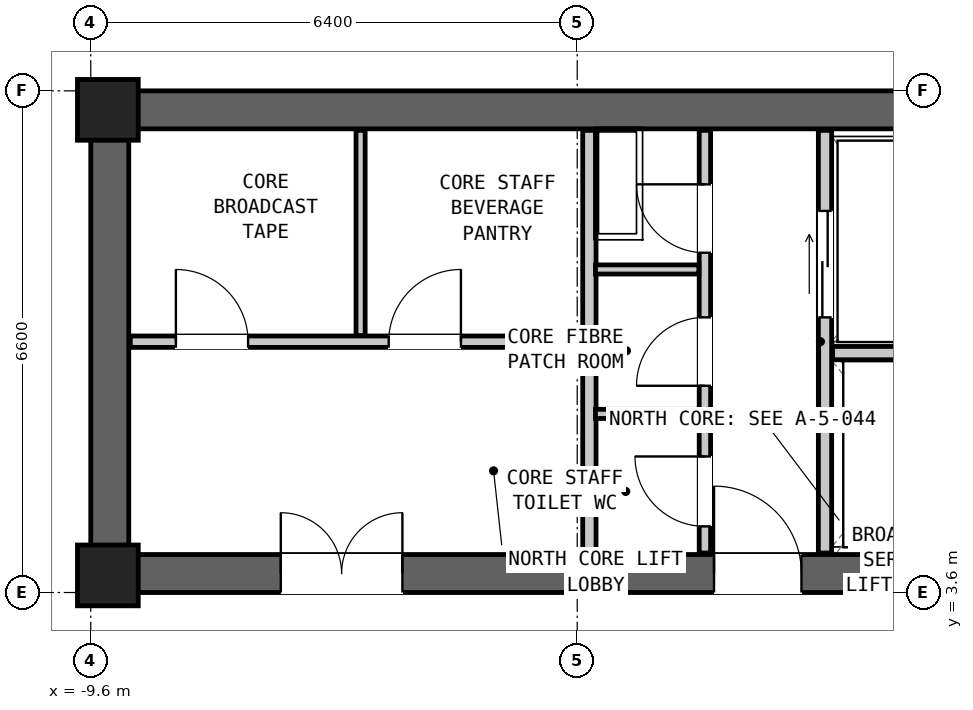
"""IFC4 building model, lengths in metres.
Left out: names, types, materials, properties, quantities, classifications, styles, units other than length and angle.
Written with IfcOpenShell. Run it as: python <this file> out.ifc"""

import sys

from ifc_helpers import new_model, si_unit, direction, frame, frame_2d, origin, origin_2d, place, context, subcontext, project, spatial, rectangle, extrude, element, fill, save


model = new_model("IFC4")
c1 = context("Model", 3, precision=1e-05, world=origin(), true_north=direction((0.0, 1.0)))
c2 = subcontext(c1, "Body", "Model", "MODEL_VIEW")
j1 = project(units=[si_unit("LENGTHUNIT", "METRE"), si_unit("PLANEANGLEUNIT", "RADIAN")], contexts=[c1])
p1 = place(None, origin())
s1 = spatial("IfcSite", under=j1, at=p1, CompositionType="ELEMENT")
p2 = place(p1, origin())
s2 = spatial("IfcBuilding", under=s1, at=p2, CompositionType="ELEMENT")
p3 = place(p2, frame((0.0, 0.0, 140.25)))
s3 = spatial("IfcBuildingStorey", under=s2, at=p3, CompositionType="ELEMENT", Elevation=140.25)
p4 = place(p3, frame((-9.6, 9.95, 0.0), z_axis=(0.0, 0.0, 1.0), x_axis=(1.0, 0.0, 0.0)))
e1 = element("IfcWall", 1, at=p4, inside=s3, PredefinedType="SHEAR", context=c2, shape_type="SweptSolid", body=[
    extrude(rectangle(XDim=19.2, YDim=0.5, at=frame_2d((9.6, 0.0))), origin(), (0.0, 0.0, 1.0), 4.35),
])
p5 = place(p3, frame((-9.6, 3.85, 0.0), z_axis=(0.0, 0.0, 1.0), x_axis=(1.0, 0.0, 0.0)))
e2 = element("IfcWall", 2, at=p5, inside=s3, PredefinedType="SHEAR", context=c2, shape_type="SweptSolid", body=[
    extrude(rectangle(XDim=19.2, YDim=0.5, at=frame_2d((9.6, 0.0))), origin(), (0.0, 0.0, 1.0), 4.35),
])
p6 = place(p5, frame((14.2, 0.0, 0.0)))
e3 = element("IfcOpeningElement", 3, at=p6, cuts=e2, PredefinedType="OPENING", context=c2, shape_type="SweptSolid", body=[
    extrude(rectangle(XDim=1.1, YDim=2.08, at=frame_2d((0.55, 1.04))), frame((0.0, 0.262, 0.0), z_axis=(0.0, -1.0, 0.0), x_axis=(1.0, 0.0, 0.0)), (0.0, 0.0, 1.0), 0.524),
])
p7 = place(p5, frame((8.2, 0.0, 0.0)))
e4 = element("IfcOpeningElement", 4, at=p7, cuts=e2, PredefinedType="OPENING", context=c2, shape_type="SweptSolid", body=[
    extrude(rectangle(XDim=1.15, YDim=2.1, at=frame_2d((0.575, 1.05))), frame((0.0, 0.262, 0.0), z_axis=(0.0, -1.0, 0.0), x_axis=(1.0, 0.0, 0.0)), (0.0, 0.0, 1.0), 0.524),
])
p8 = place(p5, frame((2.5, 0.0, 0.0)))
e5 = element("IfcOpeningElement", 5, at=p8, cuts=e2, PredefinedType="OPENING", context=c2, shape_type="SweptSolid", body=[
    extrude(rectangle(XDim=1.6, YDim=2.12, at=frame_2d((0.8, 1.06))), frame((0.0, 0.262, 0.0), z_axis=(0.0, -1.0, 0.0), x_axis=(1.0, 0.0, 0.0)), (0.0, 0.0, 1.0), 0.524),
])
p9 = place(p3, frame((-9.35, 3.6, 0.0), z_axis=(0.0, 0.0, 1.0), x_axis=(0.0, 1.0, 0.0)))
e6 = element("IfcWall", 6, at=p9, inside=s3, PredefinedType="SHEAR", context=c2, shape_type="SweptSolid", body=[
    extrude(rectangle(XDim=6.6, YDim=0.5, at=frame_2d((3.3, 0.0))), origin(), (0.0, 0.0, 1.0), 4.35),
])
for number, where, z_axis, x_axis in (
    (7, (-9.375, 9.95, 0.0), (0.0, 0.0, 1.0), (1.0, 0.0, 0.0)),
    (8, (-9.375, 3.825, 0.0), (0.0, 0.0, 1.0), (1.0, 0.0, 0.0)),
):
    element("IfcColumn", number, at=place(p3, frame(where, z_axis=z_axis, x_axis=x_axis)), inside=s3, PredefinedType="COLUMN", context=c2, shape_type="SweptSolid", body=[
        extrude(rectangle(XDim=0.8, YDim=0.8, at=origin_2d()), origin(), (0.0, 0.0, 1.0), 4.35),
    ])
p10 = place(p3, frame((0.06, 4.12, 0.0), z_axis=(0.0, 0.0, 1.0), x_axis=(0.0, 1.0, 0.0)))
e9 = element("IfcWall", 9, at=p10, inside=s3, PredefinedType="PARTITIONING", context=c2, shape_type="SweptSolid", body=[
    extrude(rectangle(XDim=5.56, YDim=0.175, at=frame_2d((2.78, 0.0))), origin(), (0.0, 0.0, 1.0), 4.07),
])
p11 = place(p10, frame((3.1, 0.0, 0.0)))
e10 = element("IfcOpeningElement", 10, at=p11, cuts=e9, PredefinedType="OPENING", context=c2, shape_type="SweptSolid", body=[
    extrude(rectangle(XDim=1.4, YDim=2.12, at=frame_2d((0.7, 1.06))), frame((0.0, 0.1, 0.0), z_axis=(0.0, -1.0, 0.0), x_axis=(1.0, 0.0, 0.0)), (0.0, 0.0, 1.0), 0.199),
])
p12 = place(p3, frame((0.16, 6.75, 0.0), z_axis=(0.0, 0.0, 1.0), x_axis=(1.0, 0.0, 0.0)))
e11 = element("IfcWall", 11, at=p12, inside=s3, PredefinedType="PARTITIONING", context=c2, shape_type="SweptSolid", body=[
    extrude(rectangle(XDim=1.98, YDim=0.175, at=frame_2d((0.99, 0.0))), origin(), (0.0, 0.0, 1.0), 4.07),
])
p13 = place(p3, frame((-3.04, 4.12, 0.0), z_axis=(0.0, 0.0, 1.0), x_axis=(0.0, 1.0, 0.0)))
e12 = element("IfcWall", 12, at=p13, inside=s3, PredefinedType="PARTITIONING", context=c2, shape_type="SweptSolid", body=[
    extrude(rectangle(XDim=5.56, YDim=0.175, at=frame_2d((2.78, 0.0))), origin(), (0.0, 0.0, 1.0), 4.07),
])
p14 = place(p3, frame((-1.52, 4.12, 0.0), z_axis=(0.0, 0.0, 1.0), x_axis=(0.0, 1.0, 0.0)))
e13 = element("IfcWall", 13, at=p14, inside=s3, PredefinedType="PARTITIONING", context=c2, shape_type="SweptSolid", body=[
    extrude(rectangle(XDim=5.56, YDim=0.15, at=frame_2d((2.78, 0.0))), origin(), (0.0, 0.0, 1.0), 4.07),
])
p15 = place(p14, frame((3.95, 0.0, 0.0)))
e14 = element("IfcOpeningElement", 14, at=p15, cuts=e13, PredefinedType="OPENING", context=c2, shape_type="SweptSolid", body=[
    extrude(rectangle(XDim=0.9, YDim=2.05, at=frame_2d((0.45, 1.025))), frame((0.0, 0.087, 0.0), z_axis=(0.0, -1.0, 0.0), x_axis=(1.0, 0.0, 0.0)), (0.0, 0.0, 1.0), 0.174),
])
p16 = place(p14, frame((2.2, 0.0, 0.0)))
e15 = element("IfcOpeningElement", 15, at=p16, cuts=e13, PredefinedType="OPENING", context=c2, shape_type="SweptSolid", body=[
    extrude(rectangle(XDim=0.9, YDim=2.05, at=frame_2d((0.45, 1.025))), frame((0.0, 0.087, 0.0), z_axis=(0.0, -1.0, 0.0), x_axis=(1.0, 0.0, 0.0)), (0.0, 0.0, 1.0), 0.174),
])
p17 = place(p14, frame((0.35, 0.0, 0.0)))
e16 = element("IfcOpeningElement", 16, at=p17, cuts=e13, PredefinedType="OPENING", context=c2, shape_type="SweptSolid", body=[
    extrude(rectangle(XDim=0.92, YDim=2.1, at=frame_2d((0.46, 1.05))), frame((0.0, 0.087, 0.0), z_axis=(0.0, -1.0, 0.0), x_axis=(1.0, 0.0, 0.0)), (0.0, 0.0, 1.0), 0.174),
])
for number, where, z_axis, x_axis in (
    (17, (-2.96, 5.95, 0.0), (0.0, 0.0, 1.0), (1.0, 0.0, 0.0)),
    (18, (-2.96, 7.85, 0.0), (0.0, 0.0, 1.0), (1.0, 0.0, 0.0)),
):
    element("IfcWall", number, at=place(p3, frame(where, z_axis=z_axis, x_axis=x_axis)), inside=s3, PredefinedType="PARTITIONING", context=c2, shape_type="SweptSolid", body=[
        extrude(rectangle(XDim=1.36, YDim=0.12, at=frame_2d((0.68, 0.0))), origin(), (0.0, 0.0, 1.0), 4.07),
    ])
p18 = place(p3, frame((-9.08, 6.9, 0.0), z_axis=(0.0, 0.0, 1.0), x_axis=(1.0, 0.0, 0.0)))
e19 = element("IfcWall", 19, at=p18, inside=s3, PredefinedType="PARTITIONING", context=c2, shape_type="SweptSolid", body=[
    extrude(rectangle(XDim=5.96, YDim=0.15, at=frame_2d((2.98, 0.0))), origin(), (0.0, 0.0, 1.0), 4.07),
])
p19 = place(p18, frame((0.6, 0.0, 0.0)))
e20 = element("IfcOpeningElement", 20, at=p19, cuts=e19, PredefinedType="OPENING", context=c2, shape_type="SweptSolid", body=[
    extrude(rectangle(XDim=0.95, YDim=2.1, at=frame_2d((0.475, 1.05))), frame((0.0, 0.087, 0.0), z_axis=(0.0, -1.0, 0.0), x_axis=(1.0, 0.0, 0.0)), (0.0, 0.0, 1.0), 0.174),
])
p20 = place(p18, frame((3.4, 0.0, 0.0)))
e21 = element("IfcOpeningElement", 21, at=p20, cuts=e19, PredefinedType="OPENING", context=c2, shape_type="SweptSolid", body=[
    extrude(rectangle(XDim=0.95, YDim=2.1, at=frame_2d((0.475, 1.05))), frame((0.0, 0.087, 0.0), z_axis=(0.0, -1.0, 0.0), x_axis=(1.0, 0.0, 0.0)), (0.0, 0.0, 1.0), 0.174),
])
p21 = place(p3, frame((-6.05, 6.98, 0.0), z_axis=(0.0, 0.0, 1.0), x_axis=(0.0, 1.0, 0.0)))
e22 = element("IfcWall", 22, at=p21, inside=s3, PredefinedType="PARTITIONING", context=c2, shape_type="SweptSolid", body=[
    extrude(rectangle(XDim=2.7, YDim=0.12, at=frame_2d((1.35, 0.0))), origin(), (0.0, 0.0, 1.0), 4.07),
])
p22 = place(p11, origin())
e23 = element("IfcDoor", 23, at=p22, inside=s3, OperationType="DOUBLE_DOOR_SLIDING", PredefinedType="DOOR", context=c2, shape_type="SweptSolid", body=[
    extrude(rectangle(XDim=1.4, YDim=2.12, at=frame_2d((0.7, 1.06))), frame((0.0, 0.025, 0.0), z_axis=(0.0, -1.0, 0.0), x_axis=(1.0, 0.0, 0.0)), (0.0, 0.0, 1.0), 0.05),
])
fill(e10, e23)
p23 = place(p7, origin())
e24 = element("IfcDoor", 24, at=p23, inside=s3, OperationType="SINGLE_SWING_LEFT", PredefinedType="DOOR", context=c2, shape_type="SweptSolid", body=[
    extrude(rectangle(XDim=1.15, YDim=2.1, at=frame_2d((0.575, 1.05))), frame((0.0, 0.025, 0.0), z_axis=(0.0, -1.0, 0.0), x_axis=(1.0, 0.0, 0.0)), (0.0, 0.0, 1.0), 0.05),
])
fill(e4, e24)
p24 = place(p15, origin())
e25 = element("IfcDoor", 25, at=p24, inside=s3, OperationType="SINGLE_SWING_RIGHT", PredefinedType="DOOR", context=c2, shape_type="SweptSolid", body=[
    extrude(rectangle(XDim=0.9, YDim=2.05, at=frame_2d((0.45, 1.025))), frame((0.0, 0.025, 0.0), z_axis=(0.0, -1.0, 0.0), x_axis=(1.0, 0.0, 0.0)), (0.0, 0.0, 1.0), 0.05),
])
fill(e14, e25)
p25 = place(p16, origin())
e26 = element("IfcDoor", 26, at=p25, inside=s3, OperationType="SINGLE_SWING_LEFT", PredefinedType="DOOR", context=c2, shape_type="SweptSolid", body=[
    extrude(rectangle(XDim=0.9, YDim=2.05, at=frame_2d((0.45, 1.025))), frame((0.0, 0.025, 0.0), z_axis=(0.0, -1.0, 0.0), x_axis=(1.0, 0.0, 0.0)), (0.0, 0.0, 1.0), 0.05),
])
fill(e15, e26)
p26 = place(p17, origin())
e27 = element("IfcDoor", 27, at=p26, inside=s3, OperationType="SINGLE_SWING_RIGHT", PredefinedType="DOOR", context=c2, shape_type="SweptSolid", body=[
    extrude(rectangle(XDim=0.92, YDim=2.1, at=frame_2d((0.46, 1.05))), frame((0.0, 0.025, 0.0), z_axis=(0.0, -1.0, 0.0), x_axis=(1.0, 0.0, 0.0)), (0.0, 0.0, 1.0), 0.05),
])
fill(e16, e27)
p27 = place(p8, origin())
e28 = element("IfcDoor", 28, at=p27, inside=s3, OperationType="DOUBLE_DOOR_SINGLE_SWING", PredefinedType="DOOR", context=c2, shape_type="SweptSolid", body=[
    extrude(rectangle(XDim=1.6, YDim=2.12, at=frame_2d((0.8, 1.06))), frame((0.0, 0.025, 0.0), z_axis=(0.0, -1.0, 0.0), x_axis=(1.0, 0.0, 0.0)), (0.0, 0.0, 1.0), 0.05),
])
fill(e5, e28)
p28 = place(p19, origin())
e29 = element("IfcDoor", 29, at=p28, inside=s3, OperationType="SINGLE_SWING_LEFT", PredefinedType="DOOR", context=c2, shape_type="SweptSolid", body=[
    extrude(rectangle(XDim=0.95, YDim=2.1, at=frame_2d((0.475, 1.05))), frame((0.0, 0.025, 0.0), z_axis=(0.0, -1.0, 0.0), x_axis=(1.0, 0.0, 0.0)), (0.0, 0.0, 1.0), 0.05),
])
fill(e20, e29)
p29 = place(p20, origin())
e30 = element("IfcDoor", 30, at=p29, inside=s3, OperationType="SINGLE_SWING_RIGHT", PredefinedType="DOOR", context=c2, shape_type="SweptSolid", body=[
    extrude(rectangle(XDim=0.95, YDim=2.1, at=frame_2d((0.475, 1.05))), frame((0.0, 0.025, 0.0), z_axis=(0.0, -1.0, 0.0), x_axis=(1.0, 0.0, 0.0)), (0.0, 0.0, 1.0), 0.05),
])
fill(e21, e30)
save(model, sys.argv[1])
